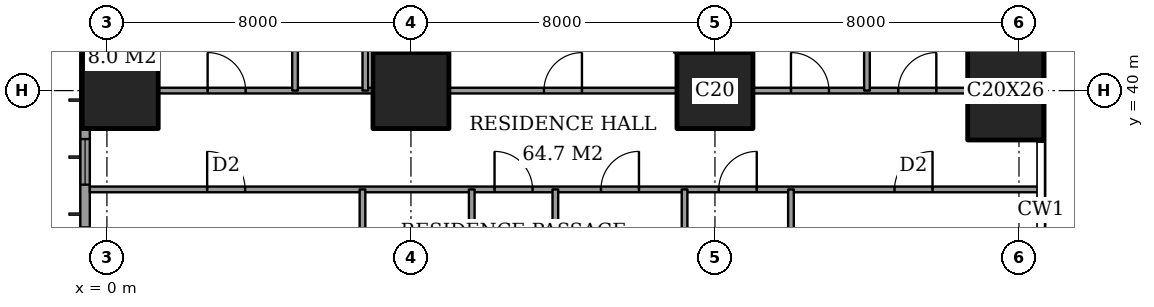
"""IFC4 building model, lengths in metres.
Left out: names, types, materials, properties, quantities, classifications, styles, units other than length and angle.
Written with IfcOpenShell. Run it as: python <this file> out.ifc"""

import sys

from ifc_helpers import new_model, si_unit, direction, frame, frame_2d, origin, origin_2d, place, context, subcontext, project, spatial, rectangle, extrude, element, fill, save


model = new_model("IFC4")
c1 = context("Model", 3, precision=1e-05, world=origin(), true_north=direction((0.0, 1.0)))
c2 = subcontext(c1, "Body", "Model", "MODEL_VIEW")
j1 = project(units=[si_unit("LENGTHUNIT", "METRE"), si_unit("PLANEANGLEUNIT", "RADIAN")], contexts=[c1])
p1 = place(None, origin())
s1 = spatial("IfcSite", under=j1, at=p1, CompositionType="ELEMENT")
p2 = place(p1, origin())
s2 = spatial("IfcBuilding", under=s1, at=p2, CompositionType="ELEMENT")
p3 = place(p2, frame((0.0, 0.0, 69.2)))
s3 = spatial("IfcBuildingStorey", under=s2, at=p3, CompositionType="ELEMENT", Elevation=69.2)
for number, where, z_axis, x_axis in (
    (1, (0.35, 40.0, 0.0), (0.0, 0.0, 1.0), (1.0, 0.0, 0.0)),
    (2, (8.0, 40.0, 0.0), (0.0, 0.0, 1.0), (1.0, 0.0, 0.0)),
    (3, (16.0, 40.0, 0.0), (0.0, 0.0, 1.0), (1.0, 0.0, 0.0)),
):
    element("IfcColumn", number, at=place(p3, frame(where, z_axis=z_axis, x_axis=x_axis)), inside=s3, PredefinedType="COLUMN", context=c2, shape_type="SweptSolid", body=[
        extrude(rectangle(XDim=2.0, YDim=2.0, at=origin_2d()), origin(), (0.0, 0.0, 1.0), 3.6),
    ])
p4 = place(p3, frame((23.65, 40.0, 0.0), z_axis=(0.0, 0.0, 1.0), x_axis=(1.0, 0.0, 0.0)))
e4 = element("IfcColumn", 4, at=p4, inside=s3, PredefinedType="COLUMN", context=c2, shape_type="SweptSolid", body=[
    extrude(rectangle(XDim=2.0, YDim=2.6, at=origin_2d()), origin(), (0.0, 0.0, 1.0), 3.6),
])
p5 = place(p3, frame((-0.575, 44.825, 0.0), z_axis=(0.0, 0.0, 1.0), x_axis=(0.0, -1.0, 0.0)))
e5 = element("IfcWall", 5, at=p5, inside=s3, PredefinedType="SOLIDWALL", context=c2, shape_type="SweptSolid", body=[
    extrude(rectangle(XDim=41.65, YDim=0.25, at=frame_2d((20.825, 0.0))), origin(), (0.0, 0.0, 1.0), 3.6),
])
p6 = place(p5, frame((0.775, 0.0, 0.6)))
e6 = element("IfcOpeningElement", 6, at=p6, cuts=e5, PredefinedType="OPENING", context=c2, shape_type="SweptSolid", body=[
    extrude(rectangle(XDim=2.4, YDim=2.0, at=frame_2d((1.2, 1.0))), frame((0.0, 0.135, 0.0), z_axis=(0.0, -1.0, 0.0), x_axis=(1.0, 0.0, 0.0)), (0.0, 0.0, 1.0), 0.27),
])
p7 = place(p5, frame((6.1, 0.0, 0.6)))
e7 = element("IfcOpeningElement", 7, at=p7, cuts=e5, PredefinedType="OPENING", context=c2, shape_type="SweptSolid", body=[
    extrude(rectangle(XDim=1.2, YDim=2.0, at=frame_2d((0.6, 1.0))), frame((0.0, 0.135, 0.0), z_axis=(0.0, -1.0, 0.0), x_axis=(1.0, 0.0, 0.0)), (0.0, 0.0, 1.0), 0.27),
])
p8 = place(p5, frame((8.425, 0.0, 0.6)))
e8 = element("IfcOpeningElement", 8, at=p8, cuts=e5, PredefinedType="OPENING", context=c2, shape_type="SweptSolid", body=[
    extrude(rectangle(XDim=2.4, YDim=2.0, at=frame_2d((1.2, 1.0))), frame((0.0, 0.135, 0.0), z_axis=(0.0, -1.0, 0.0), x_axis=(1.0, 0.0, 0.0)), (0.0, 0.0, 1.0), 0.27),
])
p9 = place(p5, frame((15.625, 0.0, 0.6)))
e9 = element("IfcOpeningElement", 9, at=p9, cuts=e5, PredefinedType="OPENING", context=c2, shape_type="SweptSolid", body=[
    extrude(rectangle(XDim=2.4, YDim=2.0, at=frame_2d((1.2, 1.0))), frame((0.0, 0.135, 0.0), z_axis=(0.0, -1.0, 0.0), x_axis=(1.0, 0.0, 0.0)), (0.0, 0.0, 1.0), 0.27),
])
p10 = place(p5, frame((23.625, 0.0, 0.6)))
e10 = element("IfcOpeningElement", 10, at=p10, cuts=e5, PredefinedType="OPENING", context=c2, shape_type="SweptSolid", body=[
    extrude(rectangle(XDim=2.4, YDim=2.0, at=frame_2d((1.2, 1.0))), frame((0.0, 0.135, 0.0), z_axis=(0.0, -1.0, 0.0), x_axis=(1.0, 0.0, 0.0)), (0.0, 0.0, 1.0), 0.27),
])
p11 = place(p5, frame((30.625, 0.0, 0.6)))
e11 = element("IfcOpeningElement", 11, at=p11, cuts=e5, PredefinedType="OPENING", context=c2, shape_type="SweptSolid", body=[
    extrude(rectangle(XDim=2.4, YDim=2.0, at=frame_2d((1.2, 1.0))), frame((0.0, 0.135, 0.0), z_axis=(0.0, -1.0, 0.0), x_axis=(1.0, 0.0, 0.0)), (0.0, 0.0, 1.0), 0.27),
])
p12 = place(p5, frame((34.225, 0.0, 0.6)))
e12 = element("IfcOpeningElement", 12, at=p12, cuts=e5, PredefinedType="OPENING", context=c2, shape_type="SweptSolid", body=[
    extrude(rectangle(XDim=1.2, YDim=2.0, at=frame_2d((0.6, 1.0))), frame((0.0, 0.135, 0.0), z_axis=(0.0, -1.0, 0.0), x_axis=(1.0, 0.0, 0.0)), (0.0, 0.0, 1.0), 0.27),
])
p13 = place(p5, frame((38.475, 0.0, 0.6)))
e13 = element("IfcOpeningElement", 13, at=p13, cuts=e5, PredefinedType="OPENING", context=c2, shape_type="SweptSolid", body=[
    extrude(rectangle(XDim=2.4, YDim=2.0, at=frame_2d((1.2, 1.0))), frame((0.0, 0.135, 0.0), z_axis=(0.0, -1.0, 0.0), x_axis=(1.0, 0.0, 0.0)), (0.0, 0.0, 1.0), 0.27),
])
p14 = place(p3, frame((-0.45, 37.4, 0.0), z_axis=(0.0, 0.0, 1.0), x_axis=(1.0, 0.0, 0.0)))
e14 = element("IfcWall", 14, at=p14, inside=s3, PredefinedType="PARTITIONING", context=c2, shape_type="SweptSolid", body=[
    extrude(rectangle(XDim=25.011, YDim=0.15, at=frame_2d((12.505, 0.0))), origin(), (0.0, 0.0, 1.0), 3.35),
])
p15 = place(p14, frame((10.65, 0.0, 0.0)))
e15 = element("IfcOpeningElement", 15, at=p15, cuts=e14, PredefinedType="OPENING", context=c2, shape_type="SweptSolid", body=[
    extrude(rectangle(XDim=1.0, YDim=2.1, at=frame_2d((0.5, 1.05))), frame((0.0, 0.085, 0.0), z_axis=(0.0, -1.0, 0.0), x_axis=(1.0, 0.0, 0.0)), (0.0, 0.0, 1.0), 0.17),
])
p16 = place(p14, frame((3.087, 0.0, 0.0)))
e16 = element("IfcOpeningElement", 16, at=p16, cuts=e14, PredefinedType="OPENING", context=c2, shape_type="SweptSolid", body=[
    extrude(rectangle(XDim=1.0, YDim=2.1, at=frame_2d((0.5, 1.05))), frame((0.0, 0.085, 0.0), z_axis=(0.0, -1.0, 0.0), x_axis=(1.0, 0.0, 0.0)), (0.0, 0.0, 1.0), 0.17),
])
p17 = place(p14, frame((13.45, 0.0, 0.0)))
e17 = element("IfcOpeningElement", 17, at=p17, cuts=e14, PredefinedType="OPENING", context=c2, shape_type="SweptSolid", body=[
    extrude(rectangle(XDim=1.0, YDim=2.1, at=frame_2d((0.5, 1.05))), frame((0.0, 0.085, 0.0), z_axis=(0.0, -1.0, 0.0), x_axis=(1.0, 0.0, 0.0)), (0.0, 0.0, 1.0), 0.17),
])
p18 = place(p14, frame((16.55, 0.0, 0.0)))
e18 = element("IfcOpeningElement", 18, at=p18, cuts=e14, PredefinedType="OPENING", context=c2, shape_type="SweptSolid", body=[
    extrude(rectangle(XDim=1.0, YDim=2.1, at=frame_2d((0.5, 1.05))), frame((0.0, 0.085, 0.0), z_axis=(0.0, -1.0, 0.0), x_axis=(1.0, 0.0, 0.0)), (0.0, 0.0, 1.0), 0.17),
])
p19 = place(p14, frame((21.175, 0.0, 0.0)))
e19 = element("IfcOpeningElement", 19, at=p19, cuts=e14, PredefinedType="OPENING", context=c2, shape_type="SweptSolid", body=[
    extrude(rectangle(XDim=1.0, YDim=2.1, at=frame_2d((0.5, 1.05))), frame((0.0, 0.085, 0.0), z_axis=(0.0, -1.0, 0.0), x_axis=(1.0, 0.0, 0.0)), (0.0, 0.0, 1.0), 0.17),
])
p20 = place(p3, frame((1.35, 40.0, 0.0), z_axis=(0.0, 0.0, 1.0), x_axis=(1.0, 0.0, 0.0)))
e20 = element("IfcWall", 20, at=p20, inside=s3, PredefinedType="PARTITIONING", context=c2, shape_type="SweptSolid", body=[
    extrude(rectangle(XDim=5.65, YDim=0.15, at=frame_2d((2.825, 0.0))), origin(), (0.0, 0.0, 1.0), 3.35),
])
p21 = place(p20, frame((1.3, 0.0, 0.0)))
e21 = element("IfcOpeningElement", 21, at=p21, cuts=e20, PredefinedType="OPENING", context=c2, shape_type="SweptSolid", body=[
    extrude(rectangle(XDim=1.0, YDim=2.1, at=frame_2d((0.5, 1.05))), frame((0.0, 0.085, 0.0), z_axis=(0.0, -1.0, 0.0), x_axis=(1.0, 0.0, 0.0)), (0.0, 0.0, 1.0), 0.17),
])
p22 = place(p3, frame((9.0, 40.0, 0.0), z_axis=(0.0, 0.0, 1.0), x_axis=(1.0, 0.0, 0.0)))
e22 = element("IfcWall", 22, at=p22, inside=s3, PredefinedType="PARTITIONING", context=c2, shape_type="SweptSolid", body=[
    extrude(rectangle(XDim=6.0, YDim=0.15, at=frame_2d((3.0, 0.0))), origin(), (0.0, 0.0, 1.0), 3.35),
])
p23 = place(p22, frame((2.5, 0.0, 0.0)))
e23 = element("IfcOpeningElement", 23, at=p23, cuts=e22, PredefinedType="OPENING", context=c2, shape_type="SweptSolid", body=[
    extrude(rectangle(XDim=1.0, YDim=2.1, at=frame_2d((0.5, 1.05))), frame((0.0, 0.085, 0.0), z_axis=(0.0, -1.0, 0.0), x_axis=(1.0, 0.0, 0.0)), (0.0, 0.0, 1.0), 0.17),
])
p24 = place(p3, frame((17.0, 40.0, 0.0), z_axis=(0.0, 0.0, 1.0), x_axis=(1.0, 0.0, 0.0)))
e24 = element("IfcWall", 24, at=p24, inside=s3, PredefinedType="PARTITIONING", context=c2, shape_type="SweptSolid", body=[
    extrude(rectangle(XDim=5.65, YDim=0.15, at=frame_2d((2.825, 0.0))), origin(), (0.0, 0.0, 1.0), 3.35),
])
p25 = place(p24, frame((1.0, 0.0, 0.0)))
e25 = element("IfcOpeningElement", 25, at=p25, cuts=e24, PredefinedType="OPENING", context=c2, shape_type="SweptSolid", body=[
    extrude(rectangle(XDim=1.0, YDim=2.1, at=frame_2d((0.5, 1.05))), frame((0.0, 0.085, 0.0), z_axis=(0.0, -1.0, 0.0), x_axis=(1.0, 0.0, 0.0)), (0.0, 0.0, 1.0), 0.17),
])
p26 = place(p24, frame((3.825, 0.0, 0.0)))
e26 = element("IfcOpeningElement", 26, at=p26, cuts=e24, PredefinedType="OPENING", context=c2, shape_type="SweptSolid", body=[
    extrude(rectangle(XDim=1.0, YDim=2.1, at=frame_2d((0.5, 1.05))), frame((0.0, 0.085, 0.0), z_axis=(0.0, -1.0, 0.0), x_axis=(1.0, 0.0, 0.0)), (0.0, 0.0, 1.0), 0.17),
])
p27 = place(p3, frame((4.95, 40.0, 0.0), z_axis=(0.0, 0.0, 1.0), x_axis=(0.0, 1.0, 0.0)))
e27 = element("IfcWall", 27, at=p27, inside=s3, PredefinedType="PARTITIONING", context=c2, shape_type="SweptSolid", body=[
    extrude(rectangle(XDim=8.45, YDim=0.15, at=frame_2d((4.225, 0.0))), origin(), (0.0, 0.0, 1.0), 3.35),
])
p28 = place(p27, frame((3.775, 0.0, 0.0)))
e28 = element("IfcOpeningElement", 28, at=p28, cuts=e27, PredefinedType="OPENING", context=c2, shape_type="SweptSolid", body=[
    extrude(rectangle(XDim=0.9, YDim=2.1, at=frame_2d((0.45, 1.05))), frame((0.0, 0.085, 0.0), z_axis=(0.0, -1.0, 0.0), x_axis=(1.0, 0.0, 0.0)), (0.0, 0.0, 1.0), 0.17),
])
p29 = place(p3, frame((6.725, 33.2, 0.0), z_axis=(0.0, 0.0, 1.0), x_axis=(0.0, 1.0, 0.0)))
e29 = element("IfcWall", 29, at=p29, inside=s3, PredefinedType="PARTITIONING", context=c2, shape_type="SweptSolid", body=[
    extrude(rectangle(XDim=4.2, YDim=0.15, at=frame_2d((2.1, 0.0))), origin(), (0.0, 0.0, 1.0), 3.35),
])
p30 = place(p29, frame((2.1, 0.0, 0.0)))
e30 = element("IfcOpeningElement", 30, at=p30, cuts=e29, PredefinedType="OPENING", context=c2, shape_type="SweptSolid", body=[
    extrude(rectangle(XDim=0.9, YDim=2.1, at=frame_2d((0.45, 1.05))), frame((0.0, 0.085, 0.0), z_axis=(0.0, -1.0, 0.0), x_axis=(1.0, 0.0, 0.0)), (0.0, 0.0, 1.0), 0.17),
])
p31 = place(p3, frame((6.8, 40.0, 0.0), z_axis=(0.0, 0.0, 1.0), x_axis=(0.0, 1.0, 0.0)))
e31 = element("IfcWall", 31, at=p31, inside=s3, PredefinedType="PARTITIONING", context=c2, shape_type="SweptSolid", body=[
    extrude(rectangle(XDim=8.45, YDim=0.15, at=frame_2d((4.225, 0.0))), origin(), (0.0, 0.0, 1.0), 3.35),
])
p32 = place(p3, frame((9.6, 28.0, 0.0), z_axis=(0.0, 0.0, 1.0), x_axis=(0.0, 1.0, 0.0)))
e32 = element("IfcWall", 32, at=p32, inside=s3, PredefinedType="PARTITIONING", context=c2, shape_type="SweptSolid", body=[
    extrude(rectangle(XDim=9.4, YDim=0.15, at=frame_2d((4.7, 0.0))), origin(), (0.0, 0.0, 1.0), 3.35),
])
p33 = place(p32, frame((0.5, 0.0, 0.0)))
e33 = element("IfcOpeningElement", 33, at=p33, cuts=e32, PredefinedType="OPENING", context=c2, shape_type="SweptSolid", body=[
    extrude(rectangle(XDim=1.0, YDim=2.1, at=frame_2d((0.5, 1.05))), frame((0.0, 0.085, 0.0), z_axis=(0.0, -1.0, 0.0), x_axis=(1.0, 0.0, 0.0)), (0.0, 0.0, 1.0), 0.17),
])
p34 = place(p3, frame((11.8, 30.0, 0.0), z_axis=(0.0, 0.0, 1.0), x_axis=(0.0, 1.0, 0.0)))
e34 = element("IfcWall", 34, at=p34, inside=s3, PredefinedType="PARTITIONING", context=c2, shape_type="SweptSolid", body=[
    extrude(rectangle(XDim=7.4, YDim=0.15, at=frame_2d((3.7, 0.0))), origin(), (0.0, 0.0, 1.0), 3.35),
])
p35 = place(p3, frame((15.2, 33.2, 0.0), z_axis=(0.0, 0.0, 1.0), x_axis=(0.0, 1.0, 0.0)))
e35 = element("IfcWall", 35, at=p35, inside=s3, PredefinedType="PARTITIONING", context=c2, shape_type="SweptSolid", body=[
    extrude(rectangle(XDim=4.2, YDim=0.15, at=frame_2d((2.1, 0.0))), origin(), (0.0, 0.0, 1.0), 3.35),
])
p36 = place(p3, frame((18.0, 31.4, 0.0), z_axis=(0.0, 0.0, 1.0), x_axis=(0.0, 1.0, 0.0)))
e36 = element("IfcWall", 36, at=p36, inside=s3, PredefinedType="PARTITIONING", context=c2, shape_type="SweptSolid", body=[
    extrude(rectangle(XDim=6.0, YDim=0.15, at=frame_2d((3.0, 0.0))), origin(), (0.0, 0.0, 1.0), 3.35),
])
p37 = place(p3, frame((20.0, 40.0, 0.0), z_axis=(0.0, 0.0, 1.0), x_axis=(0.0, 1.0, 0.0)))
e37 = element("IfcWall", 37, at=p37, inside=s3, PredefinedType="PARTITIONING", context=c2, shape_type="SweptSolid", body=[
    extrude(rectangle(XDim=8.45, YDim=0.15, at=frame_2d((4.225, 0.0))), origin(), (0.0, 0.0, 1.0), 3.35),
])
p38 = place(p7, origin())
e38 = element("IfcWindow", 38, at=p38, inside=s3, PartitioningType="SINGLE_PANEL", PredefinedType="WINDOW", context=c2, shape_type="SweptSolid", body=[
    extrude(rectangle(XDim=1.2, YDim=2.0, at=frame_2d((0.6, 1.0))), frame((0.0, 0.03, 0.0), z_axis=(0.0, -1.0, 0.0), x_axis=(1.0, 0.0, 0.0)), (0.0, 0.0, 1.0), 0.06),
])
fill(e7, e38)
p39 = place(p21, origin())
e39 = element("IfcDoor", 39, at=p39, inside=s3, OperationType="SINGLE_SWING_RIGHT", PredefinedType="DOOR", context=c2, shape_type="SweptSolid", body=[
    extrude(rectangle(XDim=1.0, YDim=2.1, at=frame_2d((0.5, 1.05))), frame((0.0, 0.025, 0.0), z_axis=(0.0, -1.0, 0.0), x_axis=(1.0, 0.0, 0.0)), (0.0, 0.0, 1.0), 0.05),
])
fill(e21, e39)
p40 = place(p23, origin())
e40 = element("IfcDoor", 40, at=p40, inside=s3, OperationType="SINGLE_SWING_LEFT", PredefinedType="DOOR", context=c2, shape_type="SweptSolid", body=[
    extrude(rectangle(XDim=1.0, YDim=2.1, at=frame_2d((0.5, 1.05))), frame((0.0, 0.025, 0.0), z_axis=(0.0, -1.0, 0.0), x_axis=(1.0, 0.0, 0.0)), (0.0, 0.0, 1.0), 0.05),
])
fill(e23, e40)
p41 = place(p25, origin())
e41 = element("IfcDoor", 41, at=p41, inside=s3, OperationType="SINGLE_SWING_RIGHT", PredefinedType="DOOR", context=c2, shape_type="SweptSolid", body=[
    extrude(rectangle(XDim=1.0, YDim=2.1, at=frame_2d((0.5, 1.05))), frame((0.0, 0.025, 0.0), z_axis=(0.0, -1.0, 0.0), x_axis=(1.0, 0.0, 0.0)), (0.0, 0.0, 1.0), 0.05),
])
fill(e25, e41)
p42 = place(p26, origin())
e42 = element("IfcDoor", 42, at=p42, inside=s3, OperationType="SINGLE_SWING_LEFT", PredefinedType="DOOR", context=c2, shape_type="SweptSolid", body=[
    extrude(rectangle(XDim=1.0, YDim=2.1, at=frame_2d((0.5, 1.05))), frame((0.0, 0.025, 0.0), z_axis=(0.0, -1.0, 0.0), x_axis=(1.0, 0.0, 0.0)), (0.0, 0.0, 1.0), 0.05),
])
fill(e26, e42)
p43 = place(p15, origin())
e43 = element("IfcDoor", 43, at=p43, inside=s3, OperationType="SINGLE_SWING_RIGHT", PredefinedType="DOOR", context=c2, shape_type="SweptSolid", body=[
    extrude(rectangle(XDim=1.0, YDim=2.1, at=frame_2d((0.5, 1.05))), frame((0.0, 0.025, 0.0), z_axis=(0.0, -1.0, 0.0), x_axis=(1.0, 0.0, 0.0)), (0.0, 0.0, 1.0), 0.05),
])
fill(e15, e43)
p44 = place(p16, origin())
e44 = element("IfcDoor", 44, at=p44, inside=s3, OperationType="SINGLE_SWING_RIGHT", PredefinedType="DOOR", context=c2, shape_type="SweptSolid", body=[
    extrude(rectangle(XDim=1.0, YDim=2.1, at=frame_2d((0.5, 1.05))), frame((0.0, 0.025, 0.0), z_axis=(0.0, -1.0, 0.0), x_axis=(1.0, 0.0, 0.0)), (0.0, 0.0, 1.0), 0.05),
])
fill(e16, e44)
p45 = place(p17, origin())
e45 = element("IfcDoor", 45, at=p45, inside=s3, OperationType="SINGLE_SWING_LEFT", PredefinedType="DOOR", context=c2, shape_type="SweptSolid", body=[
    extrude(rectangle(XDim=1.0, YDim=2.1, at=frame_2d((0.5, 1.05))), frame((0.0, 0.025, 0.0), z_axis=(0.0, -1.0, 0.0), x_axis=(1.0, 0.0, 0.0)), (0.0, 0.0, 1.0), 0.05),
])
fill(e17, e45)
p46 = place(p18, origin())
e46 = element("IfcDoor", 46, at=p46, inside=s3, OperationType="SINGLE_SWING_LEFT", PredefinedType="DOOR", context=c2, shape_type="SweptSolid", body=[
    extrude(rectangle(XDim=1.0, YDim=2.1, at=frame_2d((0.5, 1.05))), frame((0.0, 0.025, 0.0), z_axis=(0.0, -1.0, 0.0), x_axis=(1.0, 0.0, 0.0)), (0.0, 0.0, 1.0), 0.05),
])
fill(e18, e46)
p47 = place(p19, origin())
e47 = element("IfcDoor", 47, at=p47, inside=s3, OperationType="SINGLE_SWING_LEFT", PredefinedType="DOOR", context=c2, shape_type="SweptSolid", body=[
    extrude(rectangle(XDim=1.0, YDim=2.1, at=frame_2d((0.5, 1.05))), frame((0.0, 0.025, 0.0), z_axis=(0.0, -1.0, 0.0), x_axis=(1.0, 0.0, 0.0)), (0.0, 0.0, 1.0), 0.05),
])
fill(e19, e47)
save(model, sys.argv[1])
